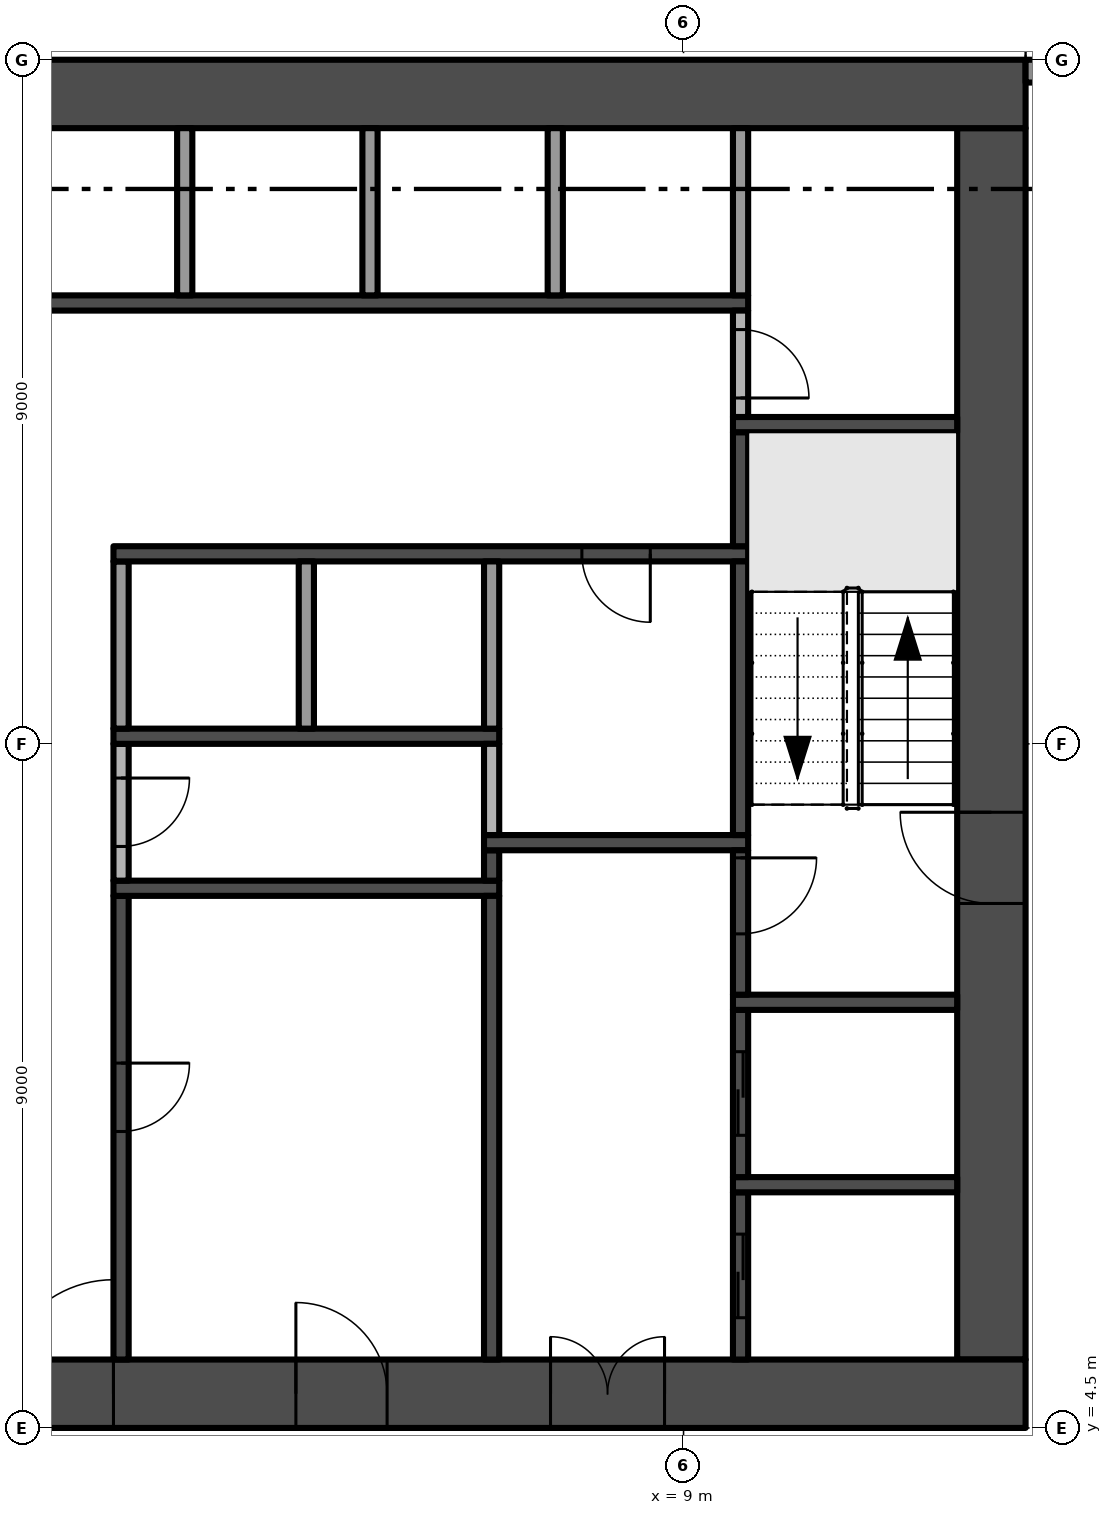
"""IFC4 building model, lengths in metres.
Left out: names, types, materials, properties, quantities, classifications, styles, units other than length and angle.
Written with IfcOpenShell. Run it as: python <this file> out.ifc"""

import sys

from ifc_helpers import new_model, si_unit, direction, frame, frame_2d, origin, place, context, subcontext, project, spatial, rectangle, extrude, element, fill, save


model = new_model("IFC4")
c1 = context("Model", 3, precision=1e-05, world=origin(), true_north=direction((0.0, 1.0)))
c2 = subcontext(c1, "Body", "Model", "MODEL_VIEW")
j1 = project(units=[si_unit("LENGTHUNIT", "METRE"), si_unit("PLANEANGLEUNIT", "RADIAN")], contexts=[c1])
p1 = place(None, origin())
s1 = spatial("IfcSite", under=j1, at=p1, CompositionType="ELEMENT")
p2 = place(p1, origin())
s2 = spatial("IfcBuilding", under=s1, at=p2, CompositionType="ELEMENT")
p3 = place(p2, frame((0.0, 0.0, 73.2)))
s3 = spatial("IfcBuildingStorey", under=s2, at=p3, CompositionType="ELEMENT", Elevation=73.2)
p4 = place(p3, frame((-13.5, 4.95, -0.3), z_axis=(0.0, 0.0, 1.0), x_axis=(1.0, 0.0, 0.0)))
e1 = element("IfcWall", 1, at=p4, inside=s3, PredefinedType="SHEAR", context=c2, shape_type="SweptSolid", body=[
    extrude(rectangle(XDim=27.0, YDim=0.9, at=frame_2d((13.5, 0.0))), origin(), (0.0, 0.0, 1.0), 3.8),
])
p5 = place(p4, frame((12.0, 0.0, 0.3)))
e2 = element("IfcOpeningElement", 2, at=p5, cuts=e1, PredefinedType="OPENING", context=c2, shape_type="SweptSolid", body=[
    extrude(rectangle(XDim=3.0, YDim=2.4, at=frame_2d((1.5, 1.2))), frame((0.0, 0.46, 0.0), z_axis=(0.0, -1.0, 0.0), x_axis=(1.0, 0.0, 0.0)), (0.0, 0.0, 1.0), 0.92),
])
p6 = place(p4, frame((4.9, 0.0, 0.3)))
e3 = element("IfcOpeningElement", 3, at=p6, cuts=e1, PredefinedType="OPENING", context=c2, shape_type="SweptSolid", body=[
    extrude(rectangle(XDim=1.2, YDim=2.2, at=frame_2d((0.6, 1.1))), frame((0.0, 0.46, 0.0), z_axis=(0.0, -1.0, 0.0), x_axis=(1.0, 0.0, 0.0)), (0.0, 0.0, 1.0), 0.92),
])
p7 = place(p4, frame((20.75, 0.0, 0.3)))
e4 = element("IfcOpeningElement", 4, at=p7, cuts=e1, PredefinedType="OPENING", context=c2, shape_type="SweptSolid", body=[
    extrude(rectangle(XDim=1.5, YDim=2.2, at=frame_2d((0.75, 1.1))), frame((0.0, 0.46, 0.0), z_axis=(0.0, -1.0, 0.0), x_axis=(1.0, 0.0, 0.0)), (0.0, 0.0, 1.0), 0.92),
])
p8 = place(p4, frame((17.4, 0.0, 0.3)))
e5 = element("IfcOpeningElement", 5, at=p8, cuts=e1, PredefinedType="OPENING", context=c2, shape_type="SweptSolid", body=[
    extrude(rectangle(XDim=1.2, YDim=2.2, at=frame_2d((0.6, 1.1))), frame((0.0, 0.46, 0.0), z_axis=(0.0, -1.0, 0.0), x_axis=(1.0, 0.0, 0.0)), (0.0, 0.0, 1.0), 0.92),
])
p9 = place(p3, frame((13.05, 5.4, -0.3), z_axis=(0.0, 0.0, 1.0), x_axis=(0.0, 1.0, 0.0)))
e6 = element("IfcWall", 6, at=p9, inside=s3, PredefinedType="SHEAR", context=c2, shape_type="SweptSolid", body=[
    extrude(rectangle(XDim=16.2, YDim=0.9, at=frame_2d((8.1, 0.0))), origin(), (0.0, 0.0, 1.0), 3.8),
])
p10 = place(p9, frame((6.0, 0.0, 0.3)))
e7 = element("IfcOpeningElement", 7, at=p10, cuts=e6, PredefinedType="OPENING", context=c2, shape_type="SweptSolid", body=[
    extrude(rectangle(XDim=1.2, YDim=2.2, at=frame_2d((0.6, 1.1))), frame((0.0, 0.46, 0.0), z_axis=(0.0, -1.0, 0.0), x_axis=(1.0, 0.0, 0.0)), (0.0, 0.0, 1.0), 0.92),
])
p11 = place(p3, frame((13.5, 22.05, -0.3), z_axis=(0.0, 0.0, 1.0), x_axis=(-1.0, 0.0, 0.0)))
e8 = element("IfcWall", 8, at=p11, inside=s3, PredefinedType="SHEAR", context=c2, shape_type="SweptSolid", body=[
    extrude(rectangle(XDim=27.0, YDim=0.9, at=frame_2d((13.5, 0.0))), origin(), (0.0, 0.0, 1.0), 3.8),
])
p12 = place(p3, frame((13.5, 22.35, 0.0), z_axis=(0.0, 0.0, 1.0), x_axis=(1.0, 0.0, 0.0)))
e9 = element("IfcWall", 9, at=p12, inside=s3, PredefinedType="SOLIDWALL", context=c2, shape_type="SweptSolid", body=[
    extrude(rectangle(XDim=3.825, YDim=0.3, at=frame_2d((1.913, 0.0))), origin(), (0.0, 0.0, 1.0), 3.5),
])
p13 = place(p12, frame((0.775, 0.0, 0.0)))
e10 = element("IfcOpeningElement", 10, at=p13, cuts=e9, PredefinedType="OPENING", context=c2, shape_type="SweptSolid", body=[
    extrude(rectangle(XDim=2.725, YDim=2.4, at=frame_2d((1.363, 1.2))), frame((0.0, 0.16, 0.0), z_axis=(0.0, -1.0, 0.0), x_axis=(1.0, 0.0, 0.0)), (0.0, 0.0, 1.0), 0.32),
])
p14 = place(p3, frame((-9.85, 19.3, 0.0), z_axis=(0.0, 0.0, 1.0), x_axis=(1.0, 0.0, 0.0)))
e11 = element("IfcWall", 11, at=p14, inside=s3, PredefinedType="SHEAR", context=c2, shape_type="SweptSolid", body=[
    extrude(rectangle(XDim=19.7, YDim=0.2, at=frame_2d((9.85, 0.0))), origin(), (0.0, 0.0, 1.0), 3.5),
])
p15 = place(p14, frame((0.769, 0.0, 0.0)))
e12 = element("IfcOpeningElement", 12, at=p15, cuts=e11, PredefinedType="OPENING", context=c2, shape_type="SweptSolid", body=[
    extrude(rectangle(XDim=1.1, YDim=2.1, at=frame_2d((0.55, 1.05))), frame((0.0, 0.11, 0.0), z_axis=(0.0, -1.0, 0.0), x_axis=(1.0, 0.0, 0.0)), (0.0, 0.0, 1.0), 0.22),
])
p16 = place(p14, frame((3.206, 0.0, 0.0)))
e13 = element("IfcOpeningElement", 13, at=p16, cuts=e11, PredefinedType="OPENING", context=c2, shape_type="SweptSolid", body=[
    extrude(rectangle(XDim=1.1, YDim=2.1, at=frame_2d((0.55, 1.05))), frame((0.0, 0.11, 0.0), z_axis=(0.0, -1.0, 0.0), x_axis=(1.0, 0.0, 0.0)), (0.0, 0.0, 1.0), 0.22),
])
p17 = place(p14, frame((5.644, 0.0, 0.0)))
e14 = element("IfcOpeningElement", 14, at=p17, cuts=e11, PredefinedType="OPENING", context=c2, shape_type="SweptSolid", body=[
    extrude(rectangle(XDim=1.1, YDim=2.1, at=frame_2d((0.55, 1.05))), frame((0.0, 0.11, 0.0), z_axis=(0.0, -1.0, 0.0), x_axis=(1.0, 0.0, 0.0)), (0.0, 0.0, 1.0), 0.22),
])
p18 = place(p14, frame((8.081, 0.0, 0.0)))
e15 = element("IfcOpeningElement", 15, at=p18, cuts=e11, PredefinedType="OPENING", context=c2, shape_type="SweptSolid", body=[
    extrude(rectangle(XDim=1.1, YDim=2.1, at=frame_2d((0.55, 1.05))), frame((0.0, 0.11, 0.0), z_axis=(0.0, -1.0, 0.0), x_axis=(1.0, 0.0, 0.0)), (0.0, 0.0, 1.0), 0.22),
])
p19 = place(p3, frame((1.6, 11.5, 0.0), z_axis=(0.0, 0.0, 1.0), x_axis=(0.0, -1.0, 0.0)))
e16 = element("IfcWall", 16, at=p19, inside=s3, PredefinedType="SHEAR", context=c2, shape_type="SweptSolid", body=[
    extrude(rectangle(XDim=6.1, YDim=0.2, at=frame_2d((3.05, 0.0))), origin(), (0.0, 0.0, 1.0), 3.5),
])
p20 = place(p19, frame((2.2, 0.0, 0.0)))
e17 = element("IfcOpeningElement", 17, at=p20, cuts=e16, PredefinedType="OPENING", context=c2, shape_type="SweptSolid", body=[
    extrude(rectangle(XDim=0.9, YDim=2.1, at=frame_2d((0.45, 1.05))), frame((0.0, 0.11, 0.0), z_axis=(0.0, -1.0, 0.0), x_axis=(1.0, 0.0, 0.0)), (0.0, 0.0, 1.0), 0.22),
])
p21 = place(p3, frame((1.5, 11.6, 0.0), z_axis=(0.0, 0.0, 1.0), x_axis=(1.0, 0.0, 0.0)))
e18 = element("IfcWall", 18, at=p21, inside=s3, PredefinedType="SHEAR", context=c2, shape_type="SweptSolid", body=[
    extrude(rectangle(XDim=5.075, YDim=0.2, at=frame_2d((2.538, 0.0))), origin(), (0.0, 0.0, 1.0), 3.5),
])
p22 = place(p3, frame((1.6, 13.5, 0.0), z_axis=(0.0, 0.0, 1.0), x_axis=(0.0, -1.0, 0.0)))
e19 = element("IfcWall", 19, at=p22, inside=s3, PredefinedType="PARTITIONING", context=c2, shape_type="SweptSolid", body=[
    extrude(rectangle(XDim=1.8, YDim=0.2, at=frame_2d((0.9, 0.0))), origin(), (0.0, 0.0, 1.0), 3.5),
])
p23 = place(p22, frame((0.45, 0.0, 0.0)))
e20 = element("IfcOpeningElement", 20, at=p23, cuts=e19, PredefinedType="OPENING", context=c2, shape_type="SweptSolid", body=[
    extrude(rectangle(XDim=0.9, YDim=2.1, at=frame_2d((0.45, 1.05))), frame((0.0, 0.11, 0.0), z_axis=(0.0, -1.0, 0.0), x_axis=(1.0, 0.0, 0.0)), (0.0, 0.0, 1.0), 0.22),
])
p24 = place(p3, frame((1.5, 13.6, 0.0), z_axis=(0.0, 0.0, 1.0), x_axis=(1.0, 0.0, 0.0)))
e21 = element("IfcWall", 21, at=p24, inside=s3, PredefinedType="SHEAR", context=c2, shape_type="SweptSolid", body=[
    extrude(rectangle(XDim=5.075, YDim=0.2, at=frame_2d((2.538, 0.0))), origin(), (0.0, 0.0, 1.0), 3.5),
])
p25 = place(p3, frame((1.6, 13.7, 0.0), z_axis=(0.0, 0.0, 1.0), x_axis=(0.0, 1.0, 0.0)))
e22 = element("IfcWall", 22, at=p25, inside=s3, PredefinedType="PARTITIONING", context=c2, shape_type="SweptSolid", body=[
    extrude(rectangle(XDim=2.2, YDim=0.2, at=frame_2d((1.1, 0.0))), origin(), (0.0, 0.0, 1.0), 3.5),
])
p26 = place(p3, frame((9.85, 16.0, 0.0), z_axis=(0.0, 0.0, 1.0), x_axis=(-1.0, 0.0, 0.0)))
e23 = element("IfcWall", 23, at=p26, inside=s3, PredefinedType="SHEAR", context=c2, shape_type="SweptSolid", body=[
    extrude(rectangle(XDim=8.35, YDim=0.2, at=frame_2d((4.175, 0.0))), origin(), (0.0, 0.0, 1.0), 3.5),
])
p27 = place(p26, frame((1.288, 0.0, 0.0)))
e24 = element("IfcOpeningElement", 24, at=p27, cuts=e23, PredefinedType="OPENING", context=c2, shape_type="SweptSolid", body=[
    extrude(rectangle(XDim=0.9, YDim=2.1, at=frame_2d((0.45, 1.05))), frame((0.0, 0.11, 0.0), z_axis=(0.0, -1.0, 0.0), x_axis=(1.0, 0.0, 0.0)), (0.0, 0.0, 1.0), 0.22),
])
for number, where, z_axis, x_axis in (
    (25, (2.438, 19.4, 0.0), (0.0, 0.0, 1.0), (0.0, 1.0, 0.0)),
    (26, (4.037, 13.7, 0.0), (0.0, 0.0, 1.0), (0.0, 1.0, 0.0)),
    (27, (4.875, 19.4, 0.0), (0.0, 0.0, 1.0), (0.0, 1.0, 0.0)),
):
    element("IfcWall", number, at=place(p3, frame(where, z_axis=z_axis, x_axis=x_axis)), inside=s3, PredefinedType="PARTITIONING", context=c2, shape_type="SweptSolid", body=[
        extrude(rectangle(XDim=2.2, YDim=0.2, at=frame_2d((1.1, 0.0))), origin(), (0.0, 0.0, 1.0), 3.5),
    ])
p28 = place(p3, frame((6.475, 5.4, 0.0), z_axis=(0.0, 0.0, 1.0), x_axis=(0.0, 1.0, 0.0)))
e28 = element("IfcWall", 28, at=p28, inside=s3, PredefinedType="SHEAR", context=c2, shape_type="SweptSolid", body=[
    extrude(rectangle(XDim=6.1, YDim=0.2, at=frame_2d((3.05, 0.0))), origin(), (0.0, 0.0, 1.0), 3.5),
])
p29 = place(p3, frame((6.475, 11.7, 0.0), z_axis=(0.0, 0.0, 1.0), x_axis=(0.0, 1.0, 0.0)))
e29 = element("IfcWall", 29, at=p29, inside=s3, PredefinedType="SHEAR", context=c2, shape_type="SweptSolid", body=[
    extrude(rectangle(XDim=0.4, YDim=0.2, at=frame_2d((0.2, 0.0))), origin(), (0.0, 0.0, 1.0), 3.5),
])
p30 = place(p3, frame((6.375, 12.2, 0.0), z_axis=(0.0, 0.0, 1.0), x_axis=(1.0, 0.0, 0.0)))
e30 = element("IfcWall", 30, at=p30, inside=s3, PredefinedType="SHEAR", context=c2, shape_type="SweptSolid", body=[
    extrude(rectangle(XDim=3.475, YDim=0.2, at=frame_2d((1.738, 0.0))), origin(), (0.0, 0.0, 1.0), 3.5),
])
p31 = place(p3, frame((6.475, 12.3, 0.0), z_axis=(0.0, 0.0, 1.0), x_axis=(0.0, 1.0, 0.0)))
e31 = element("IfcWall", 31, at=p31, inside=s3, PredefinedType="PARTITIONING", context=c2, shape_type="SweptSolid", body=[
    extrude(rectangle(XDim=1.2, YDim=0.2, at=frame_2d((0.6, 0.0))), origin(), (0.0, 0.0, 1.0), 3.5),
])
for number, where, z_axis, x_axis in (
    (32, (6.475, 13.7, 0.0), (0.0, 0.0, 1.0), (0.0, 1.0, 0.0)),
    (33, (7.312, 19.4, 0.0), (0.0, 0.0, 1.0), (0.0, 1.0, 0.0)),
):
    element("IfcWall", number, at=place(p3, frame(where, z_axis=z_axis, x_axis=x_axis)), inside=s3, PredefinedType="PARTITIONING", context=c2, shape_type="SweptSolid", body=[
        extrude(rectangle(XDim=2.2, YDim=0.2, at=frame_2d((1.1, 0.0))), origin(), (0.0, 0.0, 1.0), 3.5),
    ])
p32 = place(p3, frame((9.75, 5.4, 0.0), z_axis=(0.0, 0.0, 1.0), x_axis=(0.0, 1.0, 0.0)))
e34 = element("IfcWall", 34, at=p32, inside=s3, PredefinedType="SHEAR", context=c2, shape_type="SweptSolid", body=[
    extrude(rectangle(XDim=2.2, YDim=0.2, at=frame_2d((1.1, 0.0))), origin(), (0.0, 0.0, 1.0), 3.5),
])
p33 = place(p32, frame((0.55, 0.0, 0.0)))
e35 = element("IfcOpeningElement", 35, at=p33, cuts=e34, PredefinedType="OPENING", context=c2, shape_type="SweptSolid", body=[
    extrude(rectangle(XDim=1.1, YDim=2.1, at=frame_2d((0.55, 1.05))), frame((0.0, 0.11, 0.0), z_axis=(0.0, -1.0, 0.0), x_axis=(1.0, 0.0, 0.0)), (0.0, 0.0, 1.0), 0.22),
])
p34 = place(p3, frame((9.65, 7.7, 0.0), z_axis=(0.0, 0.0, 1.0), x_axis=(1.0, 0.0, 0.0)))
e36 = element("IfcWall", 36, at=p34, inside=s3, PredefinedType="SHEAR", context=c2, shape_type="SweptSolid", body=[
    extrude(rectangle(XDim=2.95, YDim=0.2, at=frame_2d((1.475, 0.0))), origin(), (0.0, 0.0, 1.0), 3.5),
])
p35 = place(p3, frame((9.75, 7.8, 0.0), z_axis=(0.0, 0.0, 1.0), x_axis=(0.0, 1.0, 0.0)))
e37 = element("IfcWall", 37, at=p35, inside=s3, PredefinedType="SHEAR", context=c2, shape_type="SweptSolid", body=[
    extrude(rectangle(XDim=2.2, YDim=0.2, at=frame_2d((1.1, 0.0))), origin(), (0.0, 0.0, 1.0), 3.5),
])
p36 = place(p35, frame((0.55, 0.0, 0.0)))
e38 = element("IfcOpeningElement", 38, at=p36, cuts=e37, PredefinedType="OPENING", context=c2, shape_type="SweptSolid", body=[
    extrude(rectangle(XDim=1.1, YDim=2.1, at=frame_2d((0.55, 1.05))), frame((0.0, 0.11, 0.0), z_axis=(0.0, -1.0, 0.0), x_axis=(1.0, 0.0, 0.0)), (0.0, 0.0, 1.0), 0.22),
])
p37 = place(p3, frame((9.65, 10.1, 0.0), z_axis=(0.0, 0.0, 1.0), x_axis=(1.0, 0.0, 0.0)))
e39 = element("IfcWall", 39, at=p37, inside=s3, PredefinedType="SHEAR", context=c2, shape_type="SweptSolid", body=[
    extrude(rectangle(XDim=2.95, YDim=0.2, at=frame_2d((1.475, 0.0))), origin(), (0.0, 0.0, 1.0), 3.5),
])
p38 = place(p3, frame((9.75, 12.1, 0.0), z_axis=(0.0, 0.0, 1.0), x_axis=(0.0, -1.0, 0.0)))
e40 = element("IfcWall", 40, at=p38, inside=s3, PredefinedType="SHEAR", context=c2, shape_type="SweptSolid", body=[
    extrude(rectangle(XDim=1.9, YDim=0.2, at=frame_2d((0.95, 0.0))), origin(), (0.0, 0.0, 1.0), 3.5),
])
p39 = place(p38, frame((0.1, 0.0, 0.0)))
e41 = element("IfcOpeningElement", 41, at=p39, cuts=e40, PredefinedType="OPENING", context=c2, shape_type="SweptSolid", body=[
    extrude(rectangle(XDim=1.0, YDim=2.2, at=frame_2d((0.5, 1.1))), frame((0.0, 0.11, 0.0), z_axis=(0.0, -1.0, 0.0), x_axis=(1.0, 0.0, 0.0)), (0.0, 0.0, 1.0), 0.22),
])
p40 = place(p3, frame((9.75, 12.3, 0.0), z_axis=(0.0, 0.0, 1.0), x_axis=(0.0, 1.0, 0.0)))
e42 = element("IfcWall", 42, at=p40, inside=s3, PredefinedType="SHEAR", context=c2, shape_type="SweptSolid", body=[
    extrude(rectangle(XDim=3.6, YDim=0.2, at=frame_2d((1.8, 0.0))), origin(), (0.0, 0.0, 1.0), 3.5),
])
p41 = place(p3, frame((9.75, 16.1, 0.0), z_axis=(0.0, 0.0, 1.0), x_axis=(0.0, 1.0, 0.0)))
e43 = element("IfcWall", 43, at=p41, inside=s3, PredefinedType="SHEAR", context=c2, shape_type="SweptSolid", body=[
    extrude(rectangle(XDim=1.5, YDim=0.2, at=frame_2d((0.75, 0.0))), origin(), (0.0, 0.0, 1.0), 3.5),
])
p42 = place(p3, frame((9.65, 17.7, 0.0), z_axis=(0.0, 0.0, 1.0), x_axis=(1.0, 0.0, 0.0)))
e44 = element("IfcWall", 44, at=p42, inside=s3, PredefinedType="SHEAR", context=c2, shape_type="SweptSolid", body=[
    extrude(rectangle(XDim=2.95, YDim=0.2, at=frame_2d((1.475, 0.0))), origin(), (0.0, 0.0, 1.0), 3.5),
])
p43 = place(p3, frame((9.75, 19.2, 0.0), z_axis=(0.0, 0.0, 1.0), x_axis=(0.0, -1.0, 0.0)))
e45 = element("IfcWall", 45, at=p43, inside=s3, PredefinedType="PARTITIONING", context=c2, shape_type="SweptSolid", body=[
    extrude(rectangle(XDim=1.4, YDim=0.2, at=frame_2d((0.7, 0.0))), origin(), (0.0, 0.0, 1.0), 3.5),
])
p44 = place(p43, frame((0.25, 0.0, 0.0)))
e46 = element("IfcOpeningElement", 46, at=p44, cuts=e45, PredefinedType="OPENING", context=c2, shape_type="SweptSolid", body=[
    extrude(rectangle(XDim=0.9, YDim=2.1, at=frame_2d((0.45, 1.05))), frame((0.0, 0.11, 0.0), z_axis=(0.0, -1.0, 0.0), x_axis=(1.0, 0.0, 0.0)), (0.0, 0.0, 1.0), 0.22),
])
p45 = place(p3, frame((9.75, 19.4, 0.0), z_axis=(0.0, 0.0, 1.0), x_axis=(0.0, 1.0, 0.0)))
e47 = element("IfcWall", 47, at=p45, inside=s3, PredefinedType="PARTITIONING", context=c2, shape_type="SweptSolid", body=[
    extrude(rectangle(XDim=2.2, YDim=0.2, at=frame_2d((1.1, 0.0))), origin(), (0.0, 0.0, 1.0), 3.5),
])
p46 = place(p5, frame((3.0, 0.0, 0.0), z_axis=(0.0, 0.0, 1.0), x_axis=(-1.0, 0.0, 0.0)))
e48 = element("IfcDoor", 48, at=p46, inside=s3, OperationType="DOUBLE_DOOR_SINGLE_SWING", PredefinedType="DOOR", context=c2, shape_type="SweptSolid", body=[
    extrude(rectangle(XDim=3.0, YDim=2.4, at=frame_2d((1.5, 1.2))), frame((0.0, 0.025, 0.0), z_axis=(0.0, -1.0, 0.0), x_axis=(1.0, 0.0, 0.0)), (0.0, 0.0, 1.0), 0.05),
])
fill(e2, e48)
p47 = place(p10, frame((1.2, 0.0, 0.0), z_axis=(0.0, 0.0, 1.0), x_axis=(-1.0, 0.0, 0.0)))
e49 = element("IfcDoor", 49, at=p47, inside=s3, OperationType="SINGLE_SWING_LEFT", PredefinedType="DOOR", context=c2, shape_type="SweptSolid", body=[
    extrude(rectangle(XDim=1.2, YDim=2.2, at=frame_2d((0.6, 1.1))), frame((0.0, 0.025, 0.0), z_axis=(0.0, -1.0, 0.0), x_axis=(1.0, 0.0, 0.0)), (0.0, 0.0, 1.0), 0.05),
])
fill(e7, e49)
p48 = place(p7, frame((1.5, 0.0, 0.0), z_axis=(0.0, 0.0, 1.0), x_axis=(-1.0, 0.0, 0.0)))
e50 = element("IfcDoor", 50, at=p48, inside=s3, OperationType="DOUBLE_DOOR_SINGLE_SWING", PredefinedType="DOOR", context=c2, shape_type="SweptSolid", body=[
    extrude(rectangle(XDim=1.5, YDim=2.2, at=frame_2d((0.75, 1.1))), frame((0.0, 0.025, 0.0), z_axis=(0.0, -1.0, 0.0), x_axis=(1.0, 0.0, 0.0)), (0.0, 0.0, 1.0), 0.05),
])
fill(e4, e50)
p49 = place(p8, frame((1.2, 0.0, 0.0), z_axis=(0.0, 0.0, 1.0), x_axis=(-1.0, 0.0, 0.0)))
e51 = element("IfcDoor", 51, at=p49, inside=s3, OperationType="SINGLE_SWING_RIGHT", PredefinedType="DOOR", context=c2, shape_type="SweptSolid", body=[
    extrude(rectangle(XDim=1.2, YDim=2.2, at=frame_2d((0.6, 1.1))), frame((0.0, 0.025, 0.0), z_axis=(0.0, -1.0, 0.0), x_axis=(1.0, 0.0, 0.0)), (0.0, 0.0, 1.0), 0.05),
])
fill(e5, e51)
p50 = place(p39, origin())
e52 = element("IfcDoor", 52, at=p50, inside=s3, OperationType="SINGLE_SWING_LEFT", PredefinedType="DOOR", context=c2, shape_type="SweptSolid", body=[
    extrude(rectangle(XDim=1.0, YDim=2.2, at=frame_2d((0.5, 1.1))), frame((0.0, 0.025, 0.0), z_axis=(0.0, -1.0, 0.0), x_axis=(1.0, 0.0, 0.0)), (0.0, 0.0, 1.0), 0.05),
])
fill(e41, e52)
p51 = place(p33, origin())
e53 = element("IfcDoor", 53, at=p51, inside=s3, OperationType="SLIDING_TO_RIGHT", PredefinedType="DOOR", context=c2, shape_type="SweptSolid", body=[
    extrude(rectangle(XDim=1.1, YDim=2.1, at=frame_2d((0.55, 1.05))), frame((0.0, 0.025, 0.0), z_axis=(0.0, -1.0, 0.0), x_axis=(1.0, 0.0, 0.0)), (0.0, 0.0, 1.0), 0.05),
])
fill(e35, e53)
p52 = place(p36, origin())
e54 = element("IfcDoor", 54, at=p52, inside=s3, OperationType="SLIDING_TO_RIGHT", PredefinedType="DOOR", context=c2, shape_type="SweptSolid", body=[
    extrude(rectangle(XDim=1.1, YDim=2.1, at=frame_2d((0.55, 1.05))), frame((0.0, 0.025, 0.0), z_axis=(0.0, -1.0, 0.0), x_axis=(1.0, 0.0, 0.0)), (0.0, 0.0, 1.0), 0.05),
])
fill(e38, e54)
p53 = place(p20, origin())
e55 = element("IfcDoor", 55, at=p53, inside=s3, OperationType="SINGLE_SWING_LEFT", PredefinedType="DOOR", context=c2, shape_type="SweptSolid", body=[
    extrude(rectangle(XDim=0.9, YDim=2.1, at=frame_2d((0.45, 1.05))), frame((0.0, 0.025, 0.0), z_axis=(0.0, -1.0, 0.0), x_axis=(1.0, 0.0, 0.0)), (0.0, 0.0, 1.0), 0.05),
])
fill(e17, e55)
p54 = place(p23, origin())
e56 = element("IfcDoor", 56, at=p54, inside=s3, OperationType="SINGLE_SWING_LEFT", PredefinedType="DOOR", context=c2, shape_type="SweptSolid", body=[
    extrude(rectangle(XDim=0.9, YDim=2.1, at=frame_2d((0.45, 1.05))), frame((0.0, 0.025, 0.0), z_axis=(0.0, -1.0, 0.0), x_axis=(1.0, 0.0, 0.0)), (0.0, 0.0, 1.0), 0.05),
])
fill(e20, e56)
p55 = place(p27, origin())
e57 = element("IfcDoor", 57, at=p55, inside=s3, OperationType="SINGLE_SWING_LEFT", PredefinedType="DOOR", context=c2, shape_type="SweptSolid", body=[
    extrude(rectangle(XDim=0.9, YDim=2.1, at=frame_2d((0.45, 1.05))), frame((0.0, 0.025, 0.0), z_axis=(0.0, -1.0, 0.0), x_axis=(1.0, 0.0, 0.0)), (0.0, 0.0, 1.0), 0.05),
])
fill(e24, e57)
p56 = place(p44, origin())
e58 = element("IfcDoor", 58, at=p56, inside=s3, OperationType="SINGLE_SWING_RIGHT", PredefinedType="DOOR", context=c2, shape_type="SweptSolid", body=[
    extrude(rectangle(XDim=0.9, YDim=2.1, at=frame_2d((0.45, 1.05))), frame((0.0, 0.025, 0.0), z_axis=(0.0, -1.0, 0.0), x_axis=(1.0, 0.0, 0.0)), (0.0, 0.0, 1.0), 0.05),
])
fill(e46, e58)
save(model, sys.argv[1])
